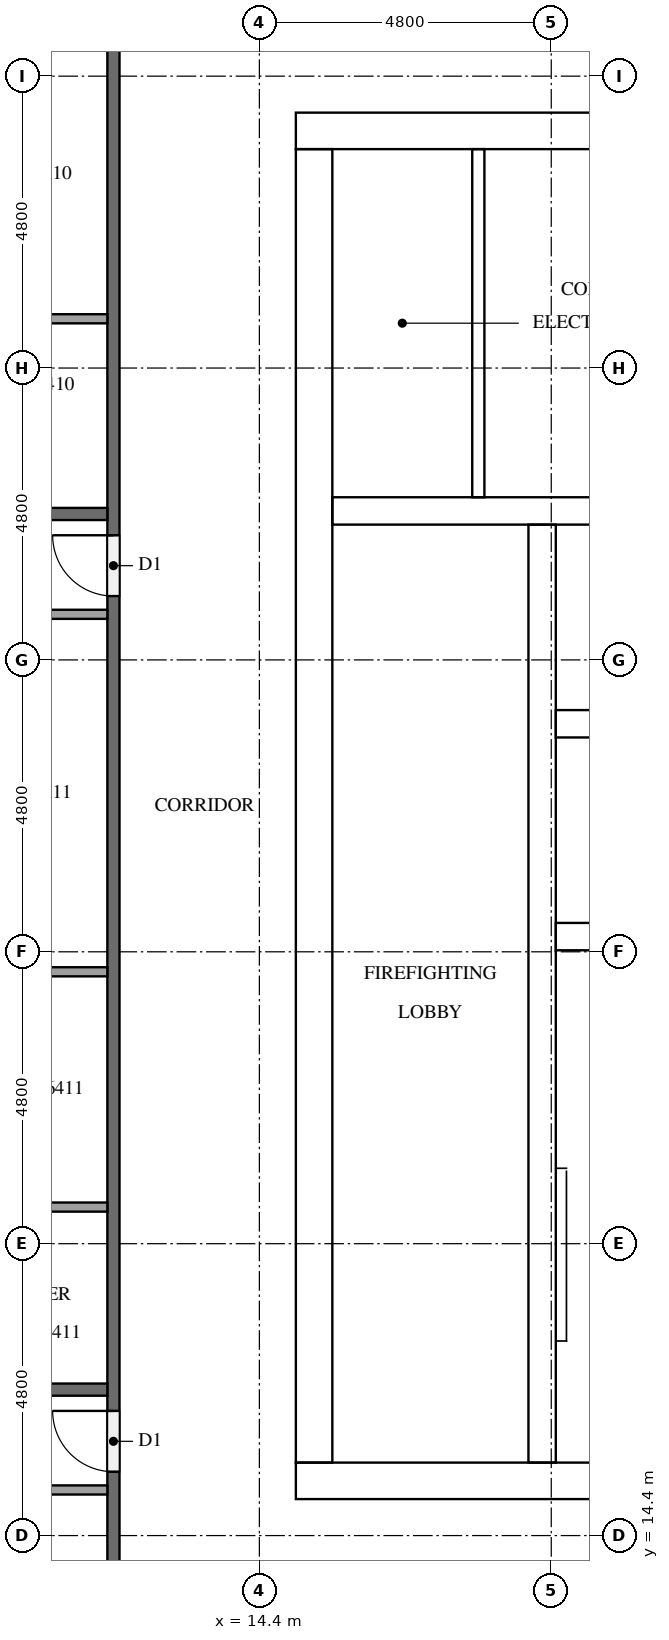
"""IFC4 building model, lengths in metres.
Left out: names, types, materials, properties, quantities, classifications, styles, units other than length and angle.
Written with IfcOpenShell. Run it as: python <this file> out.ifc"""

import sys

from ifc_helpers import new_model, si_unit, direction, frame, frame_2d, origin, place, context, subcontext, project, spatial, rectangle, extrude, element, fill, save


model = new_model("IFC4")
c1 = context("Model", 3, precision=1e-05, world=origin(), true_north=direction((0.0, 1.0)))
c2 = subcontext(c1, "Body", "Model", "MODEL_VIEW")
j1 = project(units=[si_unit("LENGTHUNIT", "METRE"), si_unit("PLANEANGLEUNIT", "RADIAN")], contexts=[c1])
p1 = place(None, origin())
s1 = spatial("IfcSite", under=j1, at=p1, CompositionType="ELEMENT")
p2 = place(p1, origin())
s2 = spatial("IfcBuilding", under=s1, at=p2, CompositionType="ELEMENT")
p3 = place(p2, frame((0.0, 0.0, 245.7)))
s3 = spatial("IfcBuildingStorey", under=s2, at=p3, CompositionType="ELEMENT", Elevation=245.7)
p4 = place(p3, frame((15.0, 15.3, 0.0), z_axis=(0.0, 0.0, 1.0), x_axis=(1.0, 0.0, 0.0)))
e1 = element("IfcWall", 1, at=p4, inside=s3, PredefinedType="SHEAR", context=c2, shape_type="SweptSolid", body=[
    extrude(rectangle(XDim=32.4, YDim=0.6, at=frame_2d((16.2, 0.0))), origin(), (0.0, 0.0, 1.0), 3.2),
])
p5 = place(p4, frame((15.3, 0.0, 0.0)))
e2 = element("IfcOpeningElement", 2, at=p5, cuts=e1, PredefinedType="OPENING", context=c2, shape_type="SweptSolid", body=[
    extrude(rectangle(XDim=1.8, YDim=2.1, at=frame_2d((0.9, 1.05))), frame((0.0, 0.31, 0.0), z_axis=(0.0, -1.0, 0.0), x_axis=(1.0, 0.0, 0.0)), (0.0, 0.0, 1.0), 0.62),
])
p6 = place(p3, frame((15.0, 37.5, 0.0), z_axis=(0.0, 0.0, 1.0), x_axis=(1.0, 0.0, 0.0)))
e3 = element("IfcWall", 3, at=p6, inside=s3, PredefinedType="SHEAR", context=c2, shape_type="SweptSolid", body=[
    extrude(rectangle(XDim=32.4, YDim=0.6, at=frame_2d((16.2, 0.0))), origin(), (0.0, 0.0, 1.0), 3.2),
])
p7 = place(p6, frame((15.3, 0.0, 0.0)))
e4 = element("IfcOpeningElement", 4, at=p7, cuts=e3, PredefinedType="OPENING", context=c2, shape_type="SweptSolid", body=[
    extrude(rectangle(XDim=1.8, YDim=2.1, at=frame_2d((0.9, 1.05))), frame((0.0, 0.31, 0.0), z_axis=(0.0, -1.0, 0.0), x_axis=(1.0, 0.0, 0.0)), (0.0, 0.0, 1.0), 0.62),
])
p8 = place(p6, frame((1.25, 0.0, 0.0)))
e5 = element("IfcOpeningElement", 5, at=p8, cuts=e3, PredefinedType="OPENING", context=c2, shape_type="SweptSolid", body=[
    extrude(rectangle(XDim=1.0, YDim=2.1, at=frame_2d((0.5, 1.05))), frame((0.0, 0.31, 0.0), z_axis=(0.0, -1.0, 0.0), x_axis=(1.0, 0.0, 0.0)), (0.0, 0.0, 1.0), 0.62),
])
p9 = place(p6, frame((4.988, 0.0, 0.0)))
e6 = element("IfcOpeningElement", 6, at=p9, cuts=e3, PredefinedType="OPENING", context=c2, shape_type="SweptSolid", body=[
    extrude(rectangle(XDim=1.0, YDim=2.1, at=frame_2d((0.5, 1.05))), frame((0.0, 0.31, 0.0), z_axis=(0.0, -1.0, 0.0), x_axis=(1.0, 0.0, 0.0)), (0.0, 0.0, 1.0), 0.62),
])
p10 = place(p3, frame((15.3, 15.6, 0.0), z_axis=(0.0, 0.0, 1.0), x_axis=(0.0, 1.0, 0.0)))
e7 = element("IfcWall", 7, at=p10, inside=s3, PredefinedType="SHEAR", context=c2, shape_type="SweptSolid", body=[
    extrude(rectangle(XDim=21.6, YDim=0.6, at=frame_2d((10.8, 0.0))), origin(), (0.0, 0.0, 1.0), 3.2),
])
p11 = place(p10, frame((5.16, 0.0, 0.0)))
e8 = element("IfcOpeningElement", 8, at=p11, cuts=e7, PredefinedType="OPENING", context=c2, shape_type="SweptSolid", body=[
    extrude(rectangle(XDim=1.2, YDim=2.1, at=frame_2d((0.6, 1.05))), frame((0.0, 0.31, 0.0), z_axis=(0.0, -1.0, 0.0), x_axis=(1.0, 0.0, 0.0)), (0.0, 0.0, 1.0), 0.62),
])
p12 = place(p3, frame((19.05, 15.6, 0.0), z_axis=(0.0, 0.0, 1.0), x_axis=(0.0, 1.0, 0.0)))
e9 = element("IfcWall", 9, at=p12, inside=s3, PredefinedType="SHEAR", context=c2, shape_type="SweptSolid", body=[
    extrude(rectangle(XDim=15.425, YDim=0.45, at=frame_2d((7.712, 0.0))), origin(), (0.0, 0.0, 1.0), 3.2),
])
p13 = place(p12, frame((9.85, 0.0, 0.0)))
e10 = element("IfcOpeningElement", 10, at=p13, cuts=e9, PredefinedType="OPENING", context=c2, shape_type="SweptSolid", body=[
    extrude(rectangle(XDim=1.1, YDim=2.1, at=frame_2d((0.55, 1.05))), frame((0.0, 0.235, 0.0), z_axis=(0.0, -1.0, 0.0), x_axis=(1.0, 0.0, 0.0)), (0.0, 0.0, 1.0), 0.47),
])
p14 = place(p12, frame((13.35, 0.0, 0.0)))
e11 = element("IfcOpeningElement", 11, at=p14, cuts=e9, PredefinedType="OPENING", context=c2, shape_type="SweptSolid", body=[
    extrude(rectangle(XDim=1.1, YDim=2.1, at=frame_2d((0.55, 1.05))), frame((0.0, 0.235, 0.0), z_axis=(0.0, -1.0, 0.0), x_axis=(1.0, 0.0, 0.0)), (0.0, 0.0, 1.0), 0.47),
])
p15 = place(p12, frame((0.6, 0.0, 0.0)))
e12 = element("IfcOpeningElement", 12, at=p15, cuts=e9, PredefinedType="OPENING", context=c2, shape_type="SweptSolid", body=[
    extrude(rectangle(XDim=1.2, YDim=2.1, at=frame_2d((0.6, 1.05))), frame((0.0, 0.235, 0.0), z_axis=(0.0, -1.0, 0.0), x_axis=(1.0, 0.0, 0.0)), (0.0, 0.0, 1.0), 0.47),
])
for number, where, z_axis, x_axis in (
    (13, (19.275, 24.25, 0.0), (0.0, 0.0, 1.0), (1.0, 0.0, 0.0)),
    (14, (19.275, 27.75, 0.0), (0.0, 0.0, 1.0), (1.0, 0.0, 0.0)),
):
    element("IfcWall", number, at=place(p3, frame(where, z_axis=z_axis, x_axis=x_axis)), inside=s3, PredefinedType="SHEAR", context=c2, shape_type="SweptSolid", body=[
        extrude(rectangle(XDim=3.6, YDim=0.45, at=frame_2d((1.8, 0.0))), origin(), (0.0, 0.0, 1.0), 3.2),
    ])
p16 = place(p3, frame((15.6, 31.25, 0.0), z_axis=(0.0, 0.0, 1.0), x_axis=(1.0, 0.0, 0.0)))
e15 = element("IfcWall", 15, at=p16, inside=s3, PredefinedType="SHEAR", context=c2, shape_type="SweptSolid", body=[
    extrude(rectangle(XDim=7.275, YDim=0.45, at=frame_2d((3.637, 0.0))), origin(), (0.0, 0.0, 1.0), 3.2),
])
p17 = place(p3, frame((18.001, 31.475, 0.0), z_axis=(0.0, 0.0, 1.0), x_axis=(0.0, 1.0, 0.0)))
e16 = element("IfcWall", 16, at=p17, inside=s3, PredefinedType="PARTITIONING", context=c2, shape_type="SweptSolid", body=[
    extrude(rectangle(XDim=5.725, YDim=0.2, at=frame_2d((2.862, 0.0))), origin(), (0.0, 0.0, 1.0), 3.2),
])
p18 = place(p3, frame((12.0, 12.1, 0.0), z_axis=(0.0, 0.0, 1.0), x_axis=(0.0, 1.0, 0.0)))
e17 = element("IfcWall", 17, at=p18, inside=s3, PredefinedType="PARTITIONING", context=c2, shape_type="SweptSolid", body=[
    extrude(rectangle(XDim=28.6, YDim=0.2, at=frame_2d((14.3, 0.0))), origin(), (0.0, 0.0, 1.0), 3.2),
])
p19 = place(p18, frame((27.35, 0.0, 0.0)))
e18 = element("IfcOpeningElement", 18, at=p19, cuts=e17, PredefinedType="OPENING", context=c2, shape_type="SweptSolid", body=[
    extrude(rectangle(XDim=1.0, YDim=2.1, at=frame_2d((0.5, 1.05))), frame((0.0, 0.11, 0.0), z_axis=(0.0, -1.0, 0.0), x_axis=(1.0, 0.0, 0.0)), (0.0, 0.0, 1.0), 0.22),
])
p20 = place(p18, frame((17.75, 0.0, 0.0)))
e19 = element("IfcOpeningElement", 19, at=p20, cuts=e17, PredefinedType="OPENING", context=c2, shape_type="SweptSolid", body=[
    extrude(rectangle(XDim=1.0, YDim=2.1, at=frame_2d((0.5, 1.05))), frame((0.0, 0.11, 0.0), z_axis=(0.0, -1.0, 0.0), x_axis=(1.0, 0.0, 0.0)), (0.0, 0.0, 1.0), 0.22),
])
p21 = place(p18, frame((3.35, 0.0, 0.0)))
e20 = element("IfcOpeningElement", 20, at=p21, cuts=e17, PredefinedType="OPENING", context=c2, shape_type="SweptSolid", body=[
    extrude(rectangle(XDim=1.0, YDim=2.1, at=frame_2d((0.5, 1.05))), frame((0.0, 0.11, 0.0), z_axis=(0.0, -1.0, 0.0), x_axis=(1.0, 0.0, 0.0)), (0.0, 0.0, 1.0), 0.22),
])
for number, where, z_axis, x_axis in (
    (21, (0.1, 31.2, 0.0), (0.0, 0.0, 1.0), (1.0, 0.0, 0.0)),
    (22, (0.1, 16.8, 0.0), (0.0, 0.0, 1.0), (1.0, 0.0, 0.0)),
):
    element("IfcWall", number, at=place(p3, frame(where, z_axis=z_axis, x_axis=x_axis)), inside=s3, PredefinedType="PARTITIONING", context=c2, shape_type="SweptSolid", body=[
        extrude(rectangle(XDim=11.8, YDim=0.2, at=frame_2d((5.9, 0.0))), origin(), (0.0, 0.0, 1.0), 3.2),
    ])
for number, where, z_axis, x_axis in (
    (23, (11.9, 34.41, 0.0), (0.0, 0.0, 1.0), (-1.0, 0.0, 0.0)),
    (24, (11.9, 23.671, 0.0), (0.0, 0.0, 1.0), (-1.0, 0.0, 0.0)),
    (25, (11.9, 19.802, 0.0), (0.0, 0.0, 1.0), (-1.0, 0.0, 0.0)),
):
    element("IfcWall", number, at=place(p3, frame(where, z_axis=z_axis, x_axis=x_axis)), inside=s3, PredefinedType="PARTITIONING", context=c2, shape_type="SweptSolid", body=[
        extrude(rectangle(XDim=3.275, YDim=0.15, at=frame_2d((1.637, 0.0))), origin(), (0.0, 0.0, 1.0), 3.2),
    ])
p22 = place(p3, frame((11.9, 29.55, 0.0), z_axis=(0.0, 0.0, 1.0), x_axis=(-1.0, 0.0, 0.0)))
e26 = element("IfcWall", 26, at=p22, inside=s3, PredefinedType="PARTITIONING", context=c2, shape_type="SweptSolid", body=[
    extrude(rectangle(XDim=3.425, YDim=0.15, at=frame_2d((1.712, 0.0))), origin(), (0.0, 0.0, 1.0), 3.2),
])
p23 = place(p3, frame((11.9, 15.15, 0.0), z_axis=(0.0, 0.0, 1.0), x_axis=(-1.0, 0.0, 0.0)))
e27 = element("IfcWall", 27, at=p23, inside=s3, PredefinedType="PARTITIONING", context=c2, shape_type="SweptSolid", body=[
    extrude(rectangle(XDim=3.125, YDim=0.15, at=frame_2d((1.562, 0.0))), origin(), (0.0, 0.0, 1.0), 3.2),
])
p24 = place(p13, origin())
e28 = element("IfcDoor", 28, at=p24, inside=s3, OperationType="DOUBLE_DOOR_SLIDING", PredefinedType="DOOR", context=c2, shape_type="SweptSolid", body=[
    extrude(rectangle(XDim=1.1, YDim=2.1, at=frame_2d((0.55, 1.05))), frame((0.0, 0.025, 0.0), z_axis=(0.0, -1.0, 0.0), x_axis=(1.0, 0.0, 0.0)), (0.0, 0.0, 1.0), 0.05),
])
fill(e10, e28)
p25 = place(p14, origin())
e29 = element("IfcDoor", 29, at=p25, inside=s3, OperationType="DOUBLE_DOOR_SLIDING", PredefinedType="DOOR", context=c2, shape_type="SweptSolid", body=[
    extrude(rectangle(XDim=1.1, YDim=2.1, at=frame_2d((0.55, 1.05))), frame((0.0, 0.025, 0.0), z_axis=(0.0, -1.0, 0.0), x_axis=(1.0, 0.0, 0.0)), (0.0, 0.0, 1.0), 0.05),
])
fill(e11, e29)
p26 = place(p15, frame((1.2, 0.0, 0.0), z_axis=(0.0, 0.0, 1.0), x_axis=(-1.0, 0.0, 0.0)))
e30 = element("IfcDoor", 30, at=p26, inside=s3, OperationType="SINGLE_SWING_RIGHT", PredefinedType="DOOR", context=c2, shape_type="SweptSolid", body=[
    extrude(rectangle(XDim=1.2, YDim=2.1, at=frame_2d((0.6, 1.05))), frame((0.0, 0.025, 0.0), z_axis=(0.0, -1.0, 0.0), x_axis=(1.0, 0.0, 0.0)), (0.0, 0.0, 1.0), 0.05),
])
fill(e12, e30)
p27 = place(p11, frame((1.2, 0.0, 0.0), z_axis=(0.0, 0.0, 1.0), x_axis=(-1.0, 0.0, 0.0)))
e31 = element("IfcDoor", 31, at=p27, inside=s3, OperationType="SINGLE_SWING_LEFT", PredefinedType="DOOR", context=c2, shape_type="SweptSolid", body=[
    extrude(rectangle(XDim=1.2, YDim=2.1, at=frame_2d((0.6, 1.05))), frame((0.0, 0.025, 0.0), z_axis=(0.0, -1.0, 0.0), x_axis=(1.0, 0.0, 0.0)), (0.0, 0.0, 1.0), 0.05),
])
fill(e8, e31)
p28 = place(p8, origin())
e32 = element("IfcDoor", 32, at=p28, inside=s3, OperationType="SINGLE_SWING_LEFT", PredefinedType="DOOR", context=c2, shape_type="SweptSolid", body=[
    extrude(rectangle(XDim=1.0, YDim=2.1, at=frame_2d((0.5, 1.05))), frame((0.0, 0.025, 0.0), z_axis=(0.0, -1.0, 0.0), x_axis=(1.0, 0.0, 0.0)), (0.0, 0.0, 1.0), 0.05),
])
fill(e5, e32)
p29 = place(p20, origin())
e33 = element("IfcDoor", 33, at=p29, inside=s3, OperationType="SINGLE_SWING_RIGHT", PredefinedType="DOOR", context=c2, shape_type="SweptSolid", body=[
    extrude(rectangle(XDim=1.0, YDim=2.1, at=frame_2d((0.5, 1.05))), frame((0.0, 0.025, 0.0), z_axis=(0.0, -1.0, 0.0), x_axis=(1.0, 0.0, 0.0)), (0.0, 0.0, 1.0), 0.05),
])
fill(e19, e33)
p30 = place(p21, origin())
e34 = element("IfcDoor", 34, at=p30, inside=s3, OperationType="SINGLE_SWING_RIGHT", PredefinedType="DOOR", context=c2, shape_type="SweptSolid", body=[
    extrude(rectangle(XDim=1.0, YDim=2.1, at=frame_2d((0.5, 1.05))), frame((0.0, 0.025, 0.0), z_axis=(0.0, -1.0, 0.0), x_axis=(1.0, 0.0, 0.0)), (0.0, 0.0, 1.0), 0.05),
])
fill(e20, e34)
save(model, sys.argv[1])
